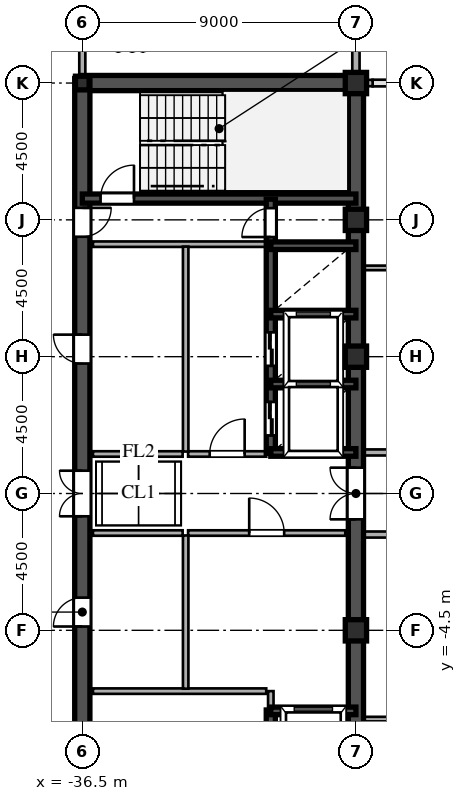
"""IFC4 building model, lengths in metres.
Left out: names, types, materials, properties, quantities, classifications, styles, units other than length and angle.
Written with IfcOpenShell. Run it as: python <this file> out.ifc"""

import sys

from ifc_helpers import new_model, si_unit, direction, frame, frame_2d, origin, origin_2d, place, context, subcontext, project, spatial, rectangle, hollow_rectangle, i_section, extrude, source, transform, mapped, element, fill, save


model = new_model("IFC4")
c1 = context("Model", 3, precision=1e-05, world=origin(), true_north=direction((0.0, 1.0)))
c2 = subcontext(c1, "Body", "Model", "MODEL_VIEW")
j1 = project(units=[si_unit("LENGTHUNIT", "METRE"), si_unit("PLANEANGLEUNIT", "RADIAN")], contexts=[c1])
p1 = place(None, origin())
s1 = spatial("IfcSite", under=j1, at=p1, CompositionType="ELEMENT")
p2 = place(p1, origin())
s2 = spatial("IfcBuilding", under=s1, at=p2, CompositionType="ELEMENT")
p3 = place(p2, frame((0.0, 0.0, 246.9)))
s3 = spatial("IfcBuildingStorey", under=s2, at=p3, CompositionType="ELEMENT", Elevation=246.9)
m1 = source(origin(), c2, "Body", "SweptSolid", [
    extrude(hollow_rectangle(XDim=0.7, YDim=0.7, WallThickness=0.03, at=origin_2d()), origin(), (0.0, 0.0, 1.0), 3.75),
])
for number, where, z_axis, x_axis in (
    (1, (-27.5, -4.5, 0.0), (0.0, 0.0, 1.0), (1.0, 0.0, 0.0)),
    (2, (-27.5, 4.5, 0.0), (0.0, 0.0, 1.0), (1.0, 0.0, 0.0)),
    (3, (-27.5, 9.0, 0.0), (0.0, 0.0, 1.0), (1.0, 0.0, 0.0)),
    (4, (-27.5, 13.5, 0.0), (0.0, 0.0, 1.0), (1.0, 0.0, 0.0)),
):
    element("IfcColumn", number, at=place(p3, frame(where, z_axis=z_axis, x_axis=x_axis)), inside=s3, PredefinedType="COLUMN", context=c2, shape_type="MappedRepresentation", body=[
        mapped(m1, transform((0.0, 0.0, 0.0), scale=1.0)),
    ])
m2 = source(origin(), c2, "Body", "SweptSolid", [
    extrude(i_section(OverallWidth=0.45, OverallDepth=0.45, WebThickness=0.016, FlangeThickness=0.025, at=origin_2d()), origin(), (0.0, 0.0, 1.0), 3.75),
])
p4 = place(p3, frame((-36.5, 13.5, 0.0), z_axis=(0.0, 0.0, 1.0), x_axis=(1.0, 0.0, 0.0)))
e5 = element("IfcColumn", 5, at=p4, inside=s3, PredefinedType="COLUMN", context=c2, shape_type="MappedRepresentation", body=[
    mapped(m2, transform((0.0, 0.0, 0.0), scale=1.0)),
])
p5 = place(p3, frame((-27.5, 13.755, 0.0), z_axis=(0.0, 0.0, 1.0), x_axis=(0.0, 1.0, 0.0)))
e6 = element("IfcWall", 6, at=p5, inside=s3, PredefinedType="SOLIDWALL", context=c2, shape_type="SweptSolid", body=[
    extrude(rectangle(XDim=0.62, YDim=0.24, at=frame_2d((0.31, 0.0))), origin(), (0.0, 0.0, 1.0), 3.03),
])
p6 = place(p3, frame((-27.5, 14.375, 0.0), z_axis=(0.0, 0.0, 1.0), x_axis=(0.0, 1.0, 0.0)))
e7 = element("IfcWall", 7, at=p6, inside=s3, PredefinedType="SOLIDWALL", context=c2, shape_type="SweptSolid", body=[
    extrude(rectangle(XDim=1.605, YDim=0.24, at=frame_2d((0.803, 0.0))), origin(), (0.0, 0.0, 1.0), 3.53),
])
p7 = place(p3, frame((-27.49, 13.5, 0.0), z_axis=(0.0, 0.0, 1.0), x_axis=(1.0, 0.0, 0.0)))
e8 = element("IfcWall", 8, at=p7, inside=s3, PredefinedType="SOLIDWALL", context=c2, shape_type="SweptSolid", body=[
    extrude(rectangle(XDim=0.54, YDim=0.21, at=frame_2d((0.27, 0.0))), origin(), (0.0, 0.0, 1.0), 3.03),
])
for number, where, z_axis, x_axis in (
    (9, (-27.5, -13.5, 0.0), (0.0, 0.0, 1.0), (0.0, 1.0, 0.0)),
    (10, (-27.5, 1.3, 0.0), (0.0, 0.0, 1.0), (0.0, 1.0, 0.0)),
):
    element("IfcWall", number, at=place(p3, frame(where, z_axis=z_axis, x_axis=x_axis)), inside=s3, PredefinedType="SHEAR", context=c2, shape_type="SweptSolid", body=[
        extrude(rectangle(XDim=12.2, YDim=0.5, at=frame_2d((6.1, 0.0))), origin(), (0.0, 0.0, 1.0), 3.53),
    ])
p8 = place(p3, frame((-27.5, -1.3, 0.0), z_axis=(0.0, 0.0, 1.0), x_axis=(0.0, 1.0, 0.0)))
e11 = element("IfcWall", 11, at=p8, inside=s3, PredefinedType="SHEAR", context=c2, shape_type="SweptSolid", body=[
    extrude(rectangle(XDim=2.6, YDim=0.5, at=frame_2d((1.3, 0.0))), origin(), (0.0, 0.0, 1.0), 3.53),
])
p9 = place(p8, frame((0.45, 0.0, 0.0)))
e12 = element("IfcOpeningElement", 12, at=p9, cuts=e11, PredefinedType="OPENING", context=c2, shape_type="SweptSolid", body=[
    extrude(rectangle(XDim=1.7, YDim=2.35, at=frame_2d((0.85, 1.175))), frame((0.0, 0.26, 0.0), z_axis=(0.0, -1.0, 0.0), x_axis=(1.0, 0.0, 0.0)), (0.0, 0.0, 1.0), 0.52),
])
p10 = place(p3, frame((-36.5, 13.5, 0.0), z_axis=(0.0, 0.0, 1.0), x_axis=(1.0, 0.0, 0.0)))
e13 = element("IfcWall", 13, at=p10, inside=s3, PredefinedType="SHEAR", context=c2, shape_type="SweptSolid", body=[
    extrude(rectangle(XDim=9.0, YDim=0.5, at=frame_2d((4.5, 0.0))), origin(), (0.0, 0.0, 1.0), 3.53),
])
p11 = place(p3, frame((-36.5, -13.65, 0.0), z_axis=(0.0, 0.0, 1.0), x_axis=(0.0, 1.0, 0.0)))
e14 = element("IfcWall", 14, at=p11, inside=s3, PredefinedType="SHEAR", context=c2, shape_type="SweptSolid", body=[
    extrude(rectangle(XDim=7.15, YDim=0.5, at=frame_2d((3.575, 0.0))), origin(), (0.0, 0.0, 1.0), 3.53),
])
p12 = place(p11, frame((4.675, 0.0, 0.0)))
e15 = element("IfcOpeningElement", 15, at=p12, cuts=e14, PredefinedType="OPENING", context=c2, shape_type="SweptSolid", body=[
    extrude(rectangle(XDim=1.15, YDim=2.2, at=frame_2d((0.575, 1.1))), frame((0.0, 0.26, 0.0), z_axis=(0.0, -1.0, 0.0), x_axis=(1.0, 0.0, 0.0)), (0.0, 0.0, 1.0), 0.52),
])
p13 = place(p3, frame((-36.5, -1.3, 0.0), z_axis=(0.0, 0.0, 1.0), x_axis=(0.0, 1.0, 0.0)))
e16 = element("IfcWall", 16, at=p13, inside=s3, PredefinedType="SHEAR", context=c2, shape_type="SweptSolid", body=[
    extrude(rectangle(XDim=2.6, YDim=0.5, at=frame_2d((1.3, 0.0))), origin(), (0.0, 0.0, 1.0), 3.53),
])
p14 = place(p13, frame((0.55, 0.0, 0.0)))
e17 = element("IfcOpeningElement", 17, at=p14, cuts=e16, PredefinedType="OPENING", context=c2, shape_type="SweptSolid", body=[
    extrude(rectangle(XDim=1.5, YDim=2.3, at=frame_2d((0.75, 1.15))), frame((0.0, 0.26, 0.0), z_axis=(0.0, -1.0, 0.0), x_axis=(1.0, 0.0, 0.0)), (0.0, 0.0, 1.0), 0.52),
])
p15 = place(p3, frame((-36.5, 8.2, 0.0), z_axis=(0.0, 0.0, 1.0), x_axis=(0.0, 1.0, 0.0)))
e18 = element("IfcWall", 18, at=p15, inside=s3, PredefinedType="SHEAR", context=c2, shape_type="SweptSolid", body=[
    extrude(rectangle(XDim=5.45, YDim=0.5, at=frame_2d((2.725, 0.0))), origin(), (0.0, 0.0, 1.0), 3.53),
])
p16 = place(p15, frame((0.245, 0.0, 0.0)))
e19 = element("IfcOpeningElement", 19, at=p16, cuts=e18, PredefinedType="OPENING", context=c2, shape_type="SweptSolid", body=[
    extrude(rectangle(XDim=0.95, YDim=2.15, at=frame_2d((0.475, 1.075))), frame((0.0, 0.26, 0.0), z_axis=(0.0, -1.0, 0.0), x_axis=(1.0, 0.0, 0.0)), (0.0, 0.0, 1.0), 0.52),
])
p17 = place(p3, frame((-36.5, -6.5, 0.0), z_axis=(0.0, 0.0, 1.0), x_axis=(0.0, 1.0, 0.0)))
e20 = element("IfcWall", 20, at=p17, inside=s3, PredefinedType="SHEAR", context=c2, shape_type="SweptSolid", body=[
    extrude(rectangle(XDim=5.2, YDim=0.5, at=frame_2d((2.6, 0.0))), origin(), (0.0, 0.0, 1.0), 3.53),
])
p18 = place(p17, frame((2.125, 0.0, 0.0)))
e21 = element("IfcOpeningElement", 21, at=p18, cuts=e20, PredefinedType="OPENING", context=c2, shape_type="SweptSolid", body=[
    extrude(rectangle(XDim=0.95, YDim=2.15, at=frame_2d((0.475, 1.075))), frame((0.0, 0.26, 0.0), z_axis=(0.0, -1.0, 0.0), x_axis=(1.0, 0.0, 0.0)), (0.0, 0.0, 1.0), 0.52),
])
p19 = place(p3, frame((-36.5, 1.3, 0.0), z_axis=(0.0, 0.0, 1.0), x_axis=(0.0, 1.0, 0.0)))
e22 = element("IfcWall", 22, at=p19, inside=s3, PredefinedType="SHEAR", context=c2, shape_type="SweptSolid", body=[
    extrude(rectangle(XDim=6.9, YDim=0.5, at=frame_2d((3.45, 0.0))), origin(), (0.0, 0.0, 1.0), 3.53),
])
p20 = place(p19, frame((2.975, 0.0, 0.0)))
e23 = element("IfcOpeningElement", 23, at=p20, cuts=e22, PredefinedType="OPENING", context=c2, shape_type="SweptSolid", body=[
    extrude(rectangle(XDim=0.95, YDim=2.15, at=frame_2d((0.475, 1.075))), frame((0.0, 0.26, 0.0), z_axis=(0.0, -1.0, 0.0), x_axis=(1.0, 0.0, 0.0)), (0.0, 0.0, 1.0), 0.52),
])
p21 = place(p3, frame((-36.5, 9.7, 0.0), z_axis=(0.0, 0.0, 1.0), x_axis=(1.0, 0.0, 0.0)))
e24 = element("IfcWall", 24, at=p21, inside=s3, PredefinedType="SHEAR", context=c2, shape_type="SweptSolid", body=[
    extrude(rectangle(XDim=9.0, YDim=0.3, at=frame_2d((4.5, 0.0))), origin(), (0.0, 0.0, 1.0), 3.53),
])
p22 = place(p21, frame((0.6, 0.0, 0.0)))
e25 = element("IfcOpeningElement", 25, at=p22, cuts=e24, PredefinedType="OPENING", context=c2, shape_type="SweptSolid", body=[
    extrude(rectangle(XDim=1.1, YDim=2.2, at=frame_2d((0.55, 1.1))), frame((0.0, 0.16, 0.0), z_axis=(0.0, -1.0, 0.0), x_axis=(1.0, 0.0, 0.0)), (0.0, 0.0, 1.0), 0.32),
])
for number, where, z_axis, x_axis in (
    (26, (-30.3, -7.15, 0.0), (0.0, 0.0, 1.0), (1.0, 0.0, 0.0)),
    (27, (-30.3, 1.35, 0.0), (0.0, 0.0, 1.0), (1.0, 0.0, 0.0)),
    (28, (-30.3, 3.6, 0.0), (0.0, 0.0, 1.0), (1.0, 0.0, 0.0)),
    (29, (-30.3, 5.9, 0.0), (0.0, 0.0, 1.0), (1.0, 0.0, 0.0)),
    (30, (-30.3, 8.15, 0.0), (0.0, 0.0, 1.0), (1.0, 0.0, 0.0)),
):
    element("IfcWall", number, at=place(p3, frame(where, z_axis=z_axis, x_axis=x_axis)), inside=s3, PredefinedType="SHEAR", context=c2, shape_type="SweptSolid", body=[
        extrude(rectangle(XDim=2.8, YDim=0.25, at=frame_2d((1.4, 0.0))), origin(), (0.0, 0.0, 1.0), 3.53),
    ])
p23 = place(p3, frame((-30.3, -9.68, 0.0), z_axis=(0.0, 0.0, 1.0), x_axis=(0.0, 1.0, 0.0)))
e31 = element("IfcWall", 31, at=p23, inside=s3, PredefinedType="SHEAR", context=c2, shape_type="SweptSolid", body=[
    extrude(rectangle(XDim=2.56, YDim=0.3, at=frame_2d((1.28, 0.0))), origin(), (0.0, 0.0, 1.0), 3.53),
])
p24 = place(p23, frame((0.68, 0.0, 0.0)))
e32 = element("IfcOpeningElement", 32, at=p24, cuts=e31, PredefinedType="OPENING", context=c2, shape_type="SweptSolid", body=[
    extrude(rectangle(XDim=1.2, YDim=2.25, at=frame_2d((0.6, 1.125))), frame((0.0, 0.16, 0.0), z_axis=(0.0, -1.0, 0.0), x_axis=(1.0, 0.0, 0.0)), (0.0, 0.0, 1.0), 0.32),
])
p25 = place(p3, frame((-30.3, 1.32, 0.0), z_axis=(0.0, 0.0, 1.0), x_axis=(0.0, 1.0, 0.0)))
e33 = element("IfcWall", 33, at=p25, inside=s3, PredefinedType="SHEAR", context=c2, shape_type="SweptSolid", body=[
    extrude(rectangle(XDim=2.28, YDim=0.3, at=frame_2d((1.14, 0.0))), origin(), (0.0, 0.0, 1.0), 3.53),
])
p26 = place(p25, frame((0.59, 0.0, 0.0)))
e34 = element("IfcOpeningElement", 34, at=p26, cuts=e33, PredefinedType="OPENING", context=c2, shape_type="SweptSolid", body=[
    extrude(rectangle(XDim=1.1, YDim=2.2, at=frame_2d((0.55, 1.1))), frame((0.0, 0.16, 0.0), z_axis=(0.0, -1.0, 0.0), x_axis=(1.0, 0.0, 0.0)), (0.0, 0.0, 1.0), 0.32),
])
p27 = place(p3, frame((-30.3, 3.6, 0.0), z_axis=(0.0, 0.0, 1.0), x_axis=(0.0, 1.0, 0.0)))
e35 = element("IfcWall", 35, at=p27, inside=s3, PredefinedType="SHEAR", context=c2, shape_type="SweptSolid", body=[
    extrude(rectangle(XDim=2.3, YDim=0.3, at=frame_2d((1.15, 0.0))), origin(), (0.0, 0.0, 1.0), 3.53),
])
p28 = place(p27, frame((0.6, 0.0, 0.0)))
e36 = element("IfcOpeningElement", 36, at=p28, cuts=e35, PredefinedType="OPENING", context=c2, shape_type="SweptSolid", body=[
    extrude(rectangle(XDim=1.1, YDim=2.2, at=frame_2d((0.55, 1.1))), frame((0.0, 0.16, 0.0), z_axis=(0.0, -1.0, 0.0), x_axis=(1.0, 0.0, 0.0)), (0.0, 0.0, 1.0), 0.32),
])
p29 = place(p3, frame((-30.3, 5.9, 0.0), z_axis=(0.0, 0.0, 1.0), x_axis=(0.0, 1.0, 0.0)))
e37 = element("IfcWall", 37, at=p29, inside=s3, PredefinedType="SHEAR", context=c2, shape_type="SweptSolid", body=[
    extrude(rectangle(XDim=2.25, YDim=0.3, at=frame_2d((1.125, 0.0))), origin(), (0.0, 0.0, 1.0), 3.53),
])
p30 = place(p3, frame((-30.3, 8.15, 0.0), z_axis=(0.0, 0.0, 1.0), x_axis=(0.0, 1.0, 0.0)))
e38 = element("IfcWall", 38, at=p30, inside=s3, PredefinedType="SHEAR", context=c2, shape_type="SweptSolid", body=[
    extrude(rectangle(XDim=1.53, YDim=0.3, at=frame_2d((0.765, 0.0))), origin(), (0.0, 0.0, 1.0), 3.53),
])
p31 = place(p30, frame((0.285, 0.0, 0.0)))
e39 = element("IfcOpeningElement", 39, at=p31, cuts=e38, PredefinedType="OPENING", context=c2, shape_type="SweptSolid", body=[
    extrude(rectangle(XDim=0.95, YDim=2.15, at=frame_2d((0.475, 1.075))), frame((0.0, 0.16, 0.0), z_axis=(0.0, -1.0, 0.0), x_axis=(1.0, 0.0, 0.0)), (0.0, 0.0, 1.0), 0.32),
])
p32 = place(p3, frame((-36.15, -6.5, 0.0), z_axis=(0.0, 0.0, 1.0), x_axis=(1.0, 0.0, 0.0)))
e40 = element("IfcWall", 40, at=p32, inside=s3, PredefinedType="PARTITIONING", context=c2, shape_type="SweptSolid", body=[
    extrude(rectangle(XDim=5.7, YDim=0.18, at=frame_2d((2.85, 0.0))), origin(), (0.0, 0.0, 1.0), 3.53),
])
p33 = place(p3, frame((-30.3, -7.12, 0.0), z_axis=(0.0, 0.0, 1.0), x_axis=(0.0, 1.0, 0.0)))
e41 = element("IfcWall", 41, at=p33, inside=s3, PredefinedType="PARTITIONING", context=c2, shape_type="SweptSolid", body=[
    extrude(rectangle(XDim=0.62, YDim=0.18, at=frame_2d((0.31, 0.0))), origin(), (0.0, 0.0, 1.0), 3.53),
])
p34 = place(p3, frame((-36.15, 8.2, 0.0), z_axis=(0.0, 0.0, 1.0), x_axis=(1.0, 0.0, 0.0)))
e42 = element("IfcWall", 42, at=p34, inside=s3, PredefinedType="PARTITIONING", context=c2, shape_type="SweptSolid", body=[
    extrude(rectangle(XDim=5.7, YDim=0.18, at=frame_2d((2.85, 0.0))), origin(), (0.0, 0.0, 1.0), 3.53),
])
p35 = place(p3, frame((-33.1, -6.42, 0.0), z_axis=(0.0, 0.0, 1.0), x_axis=(0.0, 1.0, 0.0)))
e43 = element("IfcWall", 43, at=p35, inside=s3, PredefinedType="PARTITIONING", context=c2, shape_type="SweptSolid", body=[
    extrude(rectangle(XDim=5.04, YDim=0.18, at=frame_2d((2.52, 0.0))), origin(), (0.0, 0.0, 1.0), 3.53),
])
p36 = place(p3, frame((-33.1, 1.38, 0.0), z_axis=(0.0, 0.0, 1.0), x_axis=(0.0, 1.0, 0.0)))
e44 = element("IfcWall", 44, at=p36, inside=s3, PredefinedType="PARTITIONING", context=c2, shape_type="SweptSolid", body=[
    extrude(rectangle(XDim=6.74, YDim=0.18, at=frame_2d((3.37, 0.0))), origin(), (0.0, 0.0, 1.0), 3.53),
])
p37 = place(p3, frame((-33.02, -1.3, 0.0), z_axis=(0.0, 0.0, 1.0), x_axis=(1.0, 0.0, 0.0)))
e45 = element("IfcWall", 45, at=p37, inside=s3, PredefinedType="PARTITIONING", context=c2, shape_type="SweptSolid", body=[
    extrude(rectangle(XDim=5.17, YDim=0.18, at=frame_2d((2.585, 0.0))), origin(), (0.0, 0.0, 1.0), 3.53),
])
p38 = place(p37, frame((2.01, 0.0, 0.0)))
e46 = element("IfcOpeningElement", 46, at=p38, cuts=e45, PredefinedType="OPENING", context=c2, shape_type="SweptSolid", body=[
    extrude(rectangle(XDim=1.15, YDim=2.2, at=frame_2d((0.575, 1.1))), frame((0.0, 0.1, 0.0), z_axis=(0.0, -1.0, 0.0), x_axis=(1.0, 0.0, 0.0)), (0.0, 0.0, 1.0), 0.2),
])
p39 = place(p3, frame((-33.02, 1.3, 0.0), z_axis=(0.0, 0.0, 1.0), x_axis=(1.0, 0.0, 0.0)))
e47 = element("IfcWall", 47, at=p39, inside=s3, PredefinedType="PARTITIONING", context=c2, shape_type="SweptSolid", body=[
    extrude(rectangle(XDim=2.57, YDim=0.18, at=frame_2d((1.285, 0.0))), origin(), (0.0, 0.0, 1.0), 3.53),
])
p40 = place(p39, frame((0.71, 0.0, 0.0)))
e48 = element("IfcOpeningElement", 48, at=p40, cuts=e47, PredefinedType="OPENING", context=c2, shape_type="SweptSolid", body=[
    extrude(rectangle(XDim=1.15, YDim=2.2, at=frame_2d((0.575, 1.1))), frame((0.0, 0.1, 0.0), z_axis=(0.0, -1.0, 0.0), x_axis=(1.0, 0.0, 0.0)), (0.0, 0.0, 1.0), 0.2),
])
for number, where, z_axis, x_axis in (
    (49, (-36.15, -1.3, 0.0), (0.0, 0.0, 1.0), (1.0, 0.0, 0.0)),
    (50, (-36.15, 1.3, 0.0), (0.0, 0.0, 1.0), (1.0, 0.0, 0.0)),
):
    element("IfcWall", number, at=place(p3, frame(where, z_axis=z_axis, x_axis=x_axis)), inside=s3, PredefinedType="PARTITIONING", context=c2, shape_type="SweptSolid", body=[
        extrude(rectangle(XDim=2.95, YDim=0.18, at=frame_2d((1.475, 0.0))), origin(), (0.0, 0.0, 1.0), 3.53),
    ])
p41 = place(p3, frame((-27.245, -7.42, 0.0), z_axis=(0.0, 0.0, 1.0), x_axis=(1.0, 0.0, 0.0)))
e51 = element("IfcWall", 51, at=p41, inside=s3, PredefinedType="PARTITIONING", context=c2, shape_type="SweptSolid", body=[
    extrude(rectangle(XDim=7.66, YDim=0.15, at=frame_2d((3.83, 0.0))), origin(), (0.0, 0.0, 1.0), 3.53),
])
p42 = place(p41, frame((3.57, 0.0, 0.0)))
e52 = element("IfcOpeningElement", 52, at=p42, cuts=e51, PredefinedType="OPENING", context=c2, shape_type="SweptSolid", body=[
    extrude(rectangle(XDim=0.95, YDim=2.15, at=frame_2d((0.475, 1.075))), frame((0.0, 0.085, 0.0), z_axis=(0.0, -1.0, 0.0), x_axis=(1.0, 0.0, 0.0)), (0.0, 0.0, 1.0), 0.17),
])
p43 = place(p3, frame((-27.245, -1.35, 0.0), z_axis=(0.0, 0.0, 1.0), x_axis=(1.0, 0.0, 0.0)))
e53 = element("IfcWall", 53, at=p43, inside=s3, PredefinedType="PARTITIONING", context=c2, shape_type="SweptSolid", body=[
    extrude(rectangle(XDim=54.49, YDim=0.2, at=frame_2d((27.245, 0.0))), origin(), (0.0, 0.0, 1.0), 3.53),
])
p44 = place(p43, frame((24.97, 0.0, 0.0)))
e54 = element("IfcOpeningElement", 54, at=p44, cuts=e53, PredefinedType="OPENING", context=c2, shape_type="SweptSolid", body=[
    extrude(rectangle(XDim=1.05, YDim=2.25, at=frame_2d((0.525, 1.125))), frame((0.0, 0.11, 0.0), z_axis=(0.0, -1.0, 0.0), x_axis=(1.0, 0.0, 0.0)), (0.0, 0.0, 1.0), 0.22),
])
p45 = place(p3, frame((-27.245, 1.35, 0.0), z_axis=(0.0, 0.0, 1.0), x_axis=(1.0, 0.0, 0.0)))
e55 = element("IfcWall", 55, at=p45, inside=s3, PredefinedType="PARTITIONING", context=c2, shape_type="SweptSolid", body=[
    extrude(rectangle(XDim=54.49, YDim=0.2, at=frame_2d((27.245, 0.0))), origin(), (0.0, 0.0, 1.0), 3.53),
])
p46 = place(p45, frame((24.97, 0.0, 0.0)))
e56 = element("IfcOpeningElement", 56, at=p46, cuts=e55, PredefinedType="OPENING", context=c2, shape_type="SweptSolid", body=[
    extrude(rectangle(XDim=1.05, YDim=2.25, at=frame_2d((0.525, 1.125))), frame((0.0, 0.11, 0.0), z_axis=(0.0, -1.0, 0.0), x_axis=(1.0, 0.0, 0.0)), (0.0, 0.0, 1.0), 0.22),
])
p47 = place(p3, frame((-27.245, 7.42, 0.0), z_axis=(0.0, 0.0, 1.0), x_axis=(1.0, 0.0, 0.0)))
e57 = element("IfcWall", 57, at=p47, inside=s3, PredefinedType="PARTITIONING", context=c2, shape_type="SweptSolid", body=[
    extrude(rectangle(XDim=7.66, YDim=0.15, at=frame_2d((3.83, 0.0))), origin(), (0.0, 0.0, 1.0), 3.53),
])
p48 = place(p47, frame((3.57, 0.0, 0.0)))
e58 = element("IfcOpeningElement", 58, at=p48, cuts=e57, PredefinedType="OPENING", context=c2, shape_type="SweptSolid", body=[
    extrude(rectangle(XDim=0.95, YDim=2.15, at=frame_2d((0.475, 1.075))), frame((0.0, 0.085, 0.0), z_axis=(0.0, -1.0, 0.0), x_axis=(1.0, 0.0, 0.0)), (0.0, 0.0, 1.0), 0.17),
])
p49 = place(p3, frame((-36.5, 13.755, 0.0), z_axis=(0.0, 0.0, 1.0), x_axis=(0.0, 1.0, 0.0)))
e59 = element("IfcWall", 59, at=p49, inside=s3, PredefinedType="PARTITIONING", context=c2, shape_type="SweptSolid", body=[
    extrude(rectangle(XDim=1.76, YDim=0.2, at=frame_2d((0.88, 0.0))), origin(), (0.0, 0.0, 1.0), 2.93),
])
m3 = source(origin(), c2, "Body", "SweptSolid", [
    extrude(rectangle(XDim=1.7, YDim=2.35, at=frame_2d((0.85, 1.175))), frame((0.0, 0.025, 0.0), z_axis=(0.0, -1.0, 0.0), x_axis=(1.0, 0.0, 0.0)), (0.0, 0.0, 1.0), 0.05),
])
p50 = place(p9, origin())
e60 = element("IfcDoor", 60, at=p50, inside=s3, OperationType="DOUBLE_SWING_LEFT", PredefinedType="DOOR", context=c2, shape_type="MappedRepresentation", body=[
    mapped(m3, transform((0.0, 0.0, 0.0), scale=1.0)),
])
fill(e12, e60)
m4 = source(origin(), c2, "Body", "SweptSolid", [
    extrude(rectangle(XDim=1.5, YDim=2.3, at=frame_2d((0.75, 1.15))), frame((0.0, 0.025, 0.0), z_axis=(0.0, -1.0, 0.0), x_axis=(1.0, 0.0, 0.0)), (0.0, 0.0, 1.0), 0.05),
])
p51 = place(p14, origin())
e61 = element("IfcDoor", 61, at=p51, inside=s3, OperationType="DOUBLE_SWING_LEFT", PredefinedType="DOOR", context=c2, shape_type="MappedRepresentation", body=[
    mapped(m4, transform((0.0, 0.0, 0.0), scale=1.0)),
])
fill(e17, e61)
m5 = source(origin(), c2, "Body", "SweptSolid", [
    extrude(rectangle(XDim=0.95, YDim=2.15, at=frame_2d((0.475, 1.075))), frame((0.0, 0.025, 0.0), z_axis=(0.0, -1.0, 0.0), x_axis=(1.0, 0.0, 0.0)), (0.0, 0.0, 1.0), 0.05),
])
p52 = place(p16, frame((0.95, 0.0, 0.0), z_axis=(0.0, 0.0, 1.0), x_axis=(-1.0, 0.0, 0.0)))
e62 = element("IfcDoor", 62, at=p52, inside=s3, OperationType="SINGLE_SWING_RIGHT", PredefinedType="DOOR", context=c2, shape_type="MappedRepresentation", body=[
    mapped(m5, transform((0.0, 0.0, 0.0), scale=1.0)),
])
fill(e19, e62)
p53 = place(p18, origin())
e63 = element("IfcDoor", 63, at=p53, inside=s3, OperationType="SINGLE_SWING_LEFT", PredefinedType="DOOR", context=c2, shape_type="MappedRepresentation", body=[
    mapped(m5, transform((0.0, 0.0, 0.0), scale=1.0)),
])
fill(e21, e63)
p54 = place(p20, origin())
e64 = element("IfcDoor", 64, at=p54, inside=s3, OperationType="SINGLE_SWING_RIGHT", PredefinedType="DOOR", context=c2, shape_type="MappedRepresentation", body=[
    mapped(m5, transform((0.0, 0.0, 0.0), scale=1.0)),
])
fill(e23, e64)
m6 = source(origin(), c2, "Body", "SweptSolid", [
    extrude(rectangle(XDim=1.1, YDim=2.2, at=frame_2d((0.55, 1.1))), frame((0.0, 0.025, 0.0), z_axis=(0.0, -1.0, 0.0), x_axis=(1.0, 0.0, 0.0)), (0.0, 0.0, 1.0), 0.05),
])
p55 = place(p22, origin())
e65 = element("IfcDoor", 65, at=p55, inside=s3, OperationType="SINGLE_SWING_RIGHT", PredefinedType="DOOR", context=c2, shape_type="MappedRepresentation", body=[
    mapped(m6, transform((0.0, 0.0, 0.0), scale=1.0)),
])
fill(e25, e65)
m7 = source(origin(), c2, "Body", "SweptSolid", [
    extrude(rectangle(XDim=1.1, YDim=2.2, at=frame_2d((0.55, 1.1))), frame((0.0, 0.025, 0.0), z_axis=(0.0, -1.0, 0.0), x_axis=(1.0, 0.0, 0.0)), (0.0, 0.0, 1.0), 0.05),
])
p56 = place(p26, origin())
e66 = element("IfcDoor", 66, at=p56, inside=s3, OperationType="DOUBLE_DOOR_SLIDING", PredefinedType="DOOR", context=c2, shape_type="MappedRepresentation", body=[
    mapped(m7, transform((0.0, 0.0, 0.0), scale=1.0)),
])
fill(e34, e66)
p57 = place(p28, origin())
e67 = element("IfcDoor", 67, at=p57, inside=s3, OperationType="DOUBLE_DOOR_SLIDING", PredefinedType="DOOR", context=c2, shape_type="MappedRepresentation", body=[
    mapped(m7, transform((0.0, 0.0, 0.0), scale=1.0)),
])
fill(e36, e67)
p58 = place(p31, origin())
e68 = element("IfcDoor", 68, at=p58, inside=s3, OperationType="SINGLE_SWING_LEFT", PredefinedType="DOOR", context=c2, shape_type="MappedRepresentation", body=[
    mapped(m5, transform((0.0, 0.0, 0.0), scale=1.0)),
])
fill(e39, e68)
m8 = source(origin(), c2, "Body", "SweptSolid", [
    extrude(rectangle(XDim=1.15, YDim=2.2, at=frame_2d((0.575, 1.1))), frame((0.0, 0.025, 0.0), z_axis=(0.0, -1.0, 0.0), x_axis=(1.0, 0.0, 0.0)), (0.0, 0.0, 1.0), 0.05),
])
p59 = place(p38, origin())
e69 = element("IfcDoor", 69, at=p59, inside=s3, OperationType="SINGLE_SWING_LEFT", PredefinedType="DOOR", context=c2, shape_type="MappedRepresentation", body=[
    mapped(m8, transform((0.0, 0.0, 0.0), scale=1.0)),
])
fill(e46, e69)
p60 = place(p40, origin())
e70 = element("IfcDoor", 70, at=p60, inside=s3, OperationType="SINGLE_SWING_RIGHT", PredefinedType="DOOR", context=c2, shape_type="MappedRepresentation", body=[
    mapped(m8, transform((0.0, 0.0, 0.0), scale=1.0)),
])
fill(e48, e70)
save(model, sys.argv[1])
